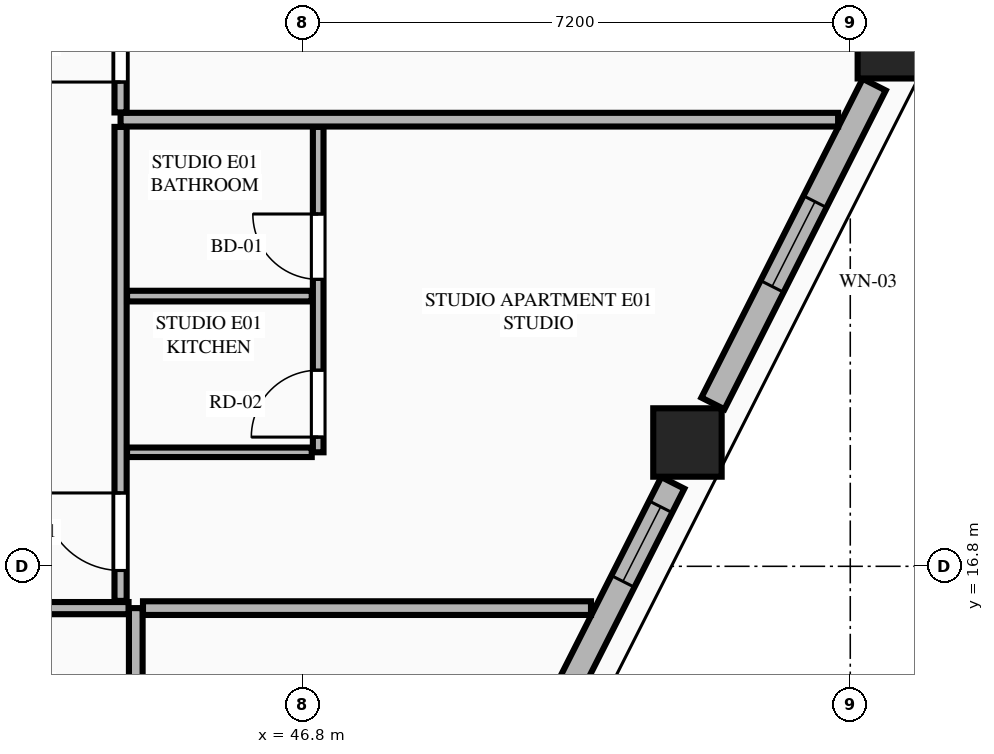
"""IFC4 building model, lengths in metres.
Left out: names, types, materials, properties, quantities, classifications, styles, units other than length and angle.
Written with IfcOpenShell. Run it as: python <this file> out.ifc"""

import sys

from ifc_helpers import new_model, si_unit, direction, frame, frame_2d, origin, origin_2d, place, context, subcontext, project, spatial, rectangle, extrude, element, fill, save


model = new_model("IFC4")
c1 = context("Model", 3, precision=1e-05, world=origin(), true_north=direction((0.0, 1.0)))
c2 = subcontext(c1, "Body", "Model", "MODEL_VIEW")
j1 = project(units=[si_unit("LENGTHUNIT", "METRE"), si_unit("PLANEANGLEUNIT", "RADIAN")], contexts=[c1])
p1 = place(None, origin())
s1 = spatial("IfcSite", under=j1, at=p1, CompositionType="ELEMENT")
p2 = place(p1, origin())
s2 = spatial("IfcBuilding", under=s1, at=p2, CompositionType="ELEMENT")
p3 = place(p2, frame((0.0, 0.0, 200.3)))
s3 = spatial("IfcBuildingStorey", under=s2, at=p3, CompositionType="ELEMENT", Elevation=200.3)
for number, where, z_axis, x_axis in (
    (1, (51.858, 18.429, 0.0), (0.0, 0.0, 1.0), (1.0, 0.0, 0.0)),
    (2, (54.547, 23.668, 0.0), (0.0, 0.0, 1.0), (1.0, 0.0, 0.0)),
):
    element("IfcColumn", number, at=place(p3, frame(where, z_axis=z_axis, x_axis=x_axis)), inside=s3, PredefinedType="COLUMN", context=c2, shape_type="SweptSolid", body=[
        extrude(rectangle(XDim=0.9, YDim=0.9, at=origin_2d()), origin(), (0.0, 0.0, 1.0), 3.55),
    ])
p4 = place(p3, frame((49.448, 13.517, 0.0), z_axis=(0.0, 0.0, 1.0), x_axis=(0.451544279509, 0.892248711763, 0.0)))
e3 = element("IfcWall", 3, at=p4, inside=s3, PredefinedType="STANDARD", context=c2, shape_type="SweptSolid", body=[
    extrude(rectangle(XDim=4.91, YDim=0.34, at=frame_2d((2.455, 0.0))), origin(), (0.0, 0.0, 1.0), 2.883),
])
p5 = place(p4, frame((0.851, 0.0, 0.75)))
e4 = element("IfcOpeningElement", 4, at=p5, cuts=e3, PredefinedType="OPENING", context=c2, shape_type="SweptSolid", body=[
    extrude(rectangle(XDim=1.1, YDim=1.983, at=frame_2d((0.55, 0.991))), frame((0.0, 0.18, 0.0), z_axis=(0.0, -1.0, 0.0), x_axis=(1.0, 0.0, 0.0)), (0.0, 0.0, 1.0), 0.36),
])
p6 = place(p4, frame((3.457, 0.0, 0.75)))
e5 = element("IfcOpeningElement", 5, at=p6, cuts=e3, PredefinedType="OPENING", context=c2, shape_type="SweptSolid", body=[
    extrude(rectangle(XDim=1.1, YDim=1.983, at=frame_2d((0.55, 0.991))), frame((0.0, 0.18, 0.0), z_axis=(0.0, -1.0, 0.0), x_axis=(1.0, 0.0, 0.0)), (0.0, 0.0, 1.0), 0.36),
])
p7 = place(p3, frame((52.193, 18.943, 0.0), z_axis=(0.0, 0.0, 1.0), x_axis=(0.451447222193, 0.892297823361, 0.0)))
e6 = element("IfcWall", 6, at=p7, inside=s3, PredefinedType="STANDARD", context=c2, shape_type="SweptSolid", body=[
    extrude(rectangle(XDim=4.7, YDim=0.34, at=frame_2d((2.35, 0.0))), origin(), (0.0, 0.0, 1.0), 2.883),
])
p8 = place(p7, frame((1.725, 0.0, 0.75)))
e7 = element("IfcOpeningElement", 7, at=p8, cuts=e6, PredefinedType="OPENING", context=c2, shape_type="SweptSolid", body=[
    extrude(rectangle(XDim=1.25, YDim=1.95, at=frame_2d((0.625, 0.975))), frame((0.0, 0.18, 0.0), z_axis=(0.0, -1.0, 0.0), x_axis=(1.0, 0.0, 0.0)), (0.0, 0.0, 1.0), 0.36),
])
p9 = place(p3, frame((44.6, 5.968, 0.0), z_axis=(0.0, 0.0, 1.0), x_axis=(0.0, 1.0, 0.0)))
e8 = element("IfcWall", 8, at=p9, inside=s3, PredefinedType="PARTITIONING", context=c2, shape_type="SweptSolid", body=[
    extrude(rectangle(XDim=10.282, YDim=0.18, at=frame_2d((5.141, 0.0))), origin(), (0.0, 0.0, 1.0), 3.35),
])
p10 = place(p3, frame((36.038, 16.25, 0.0), z_axis=(0.0, 0.0, 1.0), x_axis=(1.0, 0.0, 0.0)))
e9 = element("IfcWall", 9, at=p10, inside=s3, PredefinedType="PARTITIONING", context=c2, shape_type="SweptSolid", body=[
    extrude(rectangle(XDim=8.467, YDim=0.16, at=frame_2d((4.233, 0.0))), origin(), (0.0, 0.0, 1.0), 3.35),
])
p11 = place(p10, frame((0.355, 0.0, 0.0)))
e10 = element("IfcOpeningElement", 10, at=p11, cuts=e9, PredefinedType="OPENING", context=c2, shape_type="SweptSolid", body=[
    extrude(rectangle(XDim=1.02, YDim=2.25, at=frame_2d((0.51, 1.125))), frame((0.0, 0.09, 0.0), z_axis=(0.0, -1.0, 0.0), x_axis=(1.0, 0.0, 0.0)), (0.0, 0.0, 1.0), 0.18),
])
p12 = place(p3, frame((44.695, 16.25, 0.0), z_axis=(0.0, 0.0, 1.0), x_axis=(1.0, 0.0, 0.0)))
e11 = element("IfcWall", 11, at=p12, inside=s3, PredefinedType="PARTITIONING", context=c2, shape_type="SweptSolid", body=[
    extrude(rectangle(XDim=5.894, YDim=0.18, at=frame_2d((2.947, 0.0))), origin(), (0.0, 0.0, 1.0), 3.35),
])
p13 = place(p3, frame((44.4, 16.345, 0.0), z_axis=(0.0, 0.0, 1.0), x_axis=(0.0, 1.0, 0.0)))
e12 = element("IfcWall", 12, at=p13, inside=s3, PredefinedType="PARTITIONING", context=c2, shape_type="SweptSolid", body=[
    extrude(rectangle(XDim=6.236, YDim=0.16, at=frame_2d((3.118, 0.0))), origin(), (0.0, 0.0, 1.0), 3.35),
])
p14 = place(p13, frame((0.4, 0.0, 0.0)))
e13 = element("IfcOpeningElement", 13, at=p14, cuts=e12, PredefinedType="OPENING", context=c2, shape_type="SweptSolid", body=[
    extrude(rectangle(XDim=1.02, YDim=2.25, at=frame_2d((0.51, 1.125))), frame((0.0, 0.09, 0.0), z_axis=(0.0, -1.0, 0.0), x_axis=(1.0, 0.0, 0.0)), (0.0, 0.0, 1.0), 0.18),
])
p15 = place(p3, frame((44.485, 18.3, 0.0), z_axis=(0.0, 0.0, 1.0), x_axis=(1.0, 0.0, 0.0)))
e14 = element("IfcWall", 14, at=p15, inside=s3, PredefinedType="PARTITIONING", context=c2, shape_type="SweptSolid", body=[
    extrude(rectangle(XDim=2.43, YDim=0.125, at=frame_2d((1.215, 0.0))), origin(), (0.0, 0.0, 1.0), 2.807),
])
p16 = place(p3, frame((47.0, 18.3, 0.0), z_axis=(0.0, 0.0, 1.0), x_axis=(0.0, 1.0, 0.0)))
e15 = element("IfcWall", 15, at=p16, inside=s3, PredefinedType="PLUMBINGWALL", context=c2, shape_type="SweptSolid", body=[
    extrude(rectangle(XDim=4.281, YDim=0.14, at=frame_2d((2.141, 0.0))), origin(), (0.0, 0.0, 1.0), 3.35),
])
p17 = place(p16, frame((2.275, 0.0, 0.0)))
e16 = element("IfcOpeningElement", 16, at=p17, cuts=e15, PredefinedType="OPENING", context=c2, shape_type="SweptSolid", body=[
    extrude(rectangle(XDim=0.86, YDim=2.1, at=frame_2d((0.43, 1.05))), frame((0.0, 0.08, 0.0), z_axis=(0.0, -1.0, 0.0), x_axis=(1.0, 0.0, 0.0)), (0.0, 0.0, 1.0), 0.16),
])
p18 = place(p16, frame((0.2, 0.0, 0.0)))
e17 = element("IfcOpeningElement", 17, at=p18, cuts=e15, PredefinedType="OPENING", context=c2, shape_type="SweptSolid", body=[
    extrude(rectangle(XDim=0.88, YDim=2.15, at=frame_2d((0.44, 1.075))), frame((0.0, 0.08, 0.0), z_axis=(0.0, -1.0, 0.0), x_axis=(1.0, 0.0, 0.0)), (0.0, 0.0, 1.0), 0.16),
])
p19 = place(p3, frame((44.485, 20.355, 0.0), z_axis=(0.0, 0.0, 1.0), x_axis=(1.0, 0.0, 0.0)))
e18 = element("IfcWall", 18, at=p19, inside=s3, PredefinedType="PLUMBINGWALL", context=c2, shape_type="SweptSolid", body=[
    extrude(rectangle(XDim=2.43, YDim=0.14, at=frame_2d((1.215, 0.0))), origin(), (0.0, 0.0, 1.0), 3.35),
])
p20 = place(p3, frame((44.4, 22.676, 0.0), z_axis=(0.0, 0.0, 1.0), x_axis=(1.0, 0.0, 0.0)))
e19 = element("IfcWall", 19, at=p20, inside=s3, PredefinedType="PARTITIONING", context=c2, shape_type="SweptSolid", body=[
    extrude(rectangle(XDim=9.44, YDim=0.18, at=frame_2d((4.72, 0.0))), origin(), (0.0, 0.0, 1.0), 3.35),
])
p21 = place(p3, frame((44.4, 22.771, 0.0), z_axis=(0.0, 0.0, 1.0), x_axis=(0.0, 1.0, 0.0)))
e20 = element("IfcWall", 20, at=p21, inside=s3, PredefinedType="PARTITIONING", context=c2, shape_type="SweptSolid", body=[
    extrude(rectangle(XDim=6.047, YDim=0.16, at=frame_2d((3.023, 0.0))), origin(), (0.0, 0.0, 1.0), 3.35),
])
p22 = place(p21, frame((0.4, 0.0, 0.0)))
e21 = element("IfcOpeningElement", 21, at=p22, cuts=e20, PredefinedType="OPENING", context=c2, shape_type="SweptSolid", body=[
    extrude(rectangle(XDim=1.02, YDim=2.25, at=frame_2d((0.51, 1.125))), frame((0.0, 0.09, 0.0), z_axis=(0.0, -1.0, 0.0), x_axis=(1.0, 0.0, 0.0)), (0.0, 0.0, 1.0), 0.18),
])
p23 = place(p8, origin())
e22 = element("IfcWindow", 22, at=p23, inside=s3, PartitioningType="SINGLE_PANEL", PredefinedType="WINDOW", context=c2, shape_type="SweptSolid", body=[
    extrude(rectangle(XDim=1.25, YDim=1.95, at=frame_2d((0.625, 0.975))), frame((0.0, 0.03, 0.0), z_axis=(0.0, -1.0, 0.0), x_axis=(1.0, 0.0, 0.0)), (0.0, 0.0, 1.0), 0.06),
])
fill(e7, e22)
p24 = place(p17, origin())
e23 = element("IfcDoor", 23, at=p24, inside=s3, OperationType="SINGLE_SWING_RIGHT", PredefinedType="DOOR", context=c2, shape_type="SweptSolid", body=[
    extrude(rectangle(XDim=0.86, YDim=2.1, at=frame_2d((0.43, 1.05))), frame((0.0, 0.025, 0.0), z_axis=(0.0, -1.0, 0.0), x_axis=(1.0, 0.0, 0.0)), (0.0, 0.0, 1.0), 0.05),
])
fill(e16, e23)
p25 = place(p14, origin())
e24 = element("IfcDoor", 24, at=p25, inside=s3, OperationType="SINGLE_SWING_RIGHT", PredefinedType="DOOR", context=c2, shape_type="SweptSolid", body=[
    extrude(rectangle(XDim=1.02, YDim=2.25, at=frame_2d((0.51, 1.125))), frame((0.0, 0.025, 0.0), z_axis=(0.0, -1.0, 0.0), x_axis=(1.0, 0.0, 0.0)), (0.0, 0.0, 1.0), 0.05),
])
fill(e13, e24)
p26 = place(p18, origin())
e25 = element("IfcDoor", 25, at=p26, inside=s3, OperationType="SINGLE_SWING_LEFT", PredefinedType="DOOR", context=c2, shape_type="SweptSolid", body=[
    extrude(rectangle(XDim=0.88, YDim=2.15, at=frame_2d((0.44, 1.075))), frame((0.0, 0.025, 0.0), z_axis=(0.0, -1.0, 0.0), x_axis=(1.0, 0.0, 0.0)), (0.0, 0.0, 1.0), 0.05),
])
fill(e17, e25)
p27 = place(p22, origin())
e26 = element("IfcDoor", 26, at=p27, inside=s3, OperationType="SINGLE_SWING_LEFT", PredefinedType="DOOR", context=c2, shape_type="SweptSolid", body=[
    extrude(rectangle(XDim=1.02, YDim=2.25, at=frame_2d((0.51, 1.125))), frame((0.0, 0.025, 0.0), z_axis=(0.0, -1.0, 0.0), x_axis=(1.0, 0.0, 0.0)), (0.0, 0.0, 1.0), 0.05),
])
fill(e21, e26)
p28 = place(p6, origin())
e27 = element("IfcWindow", 27, at=p28, inside=s3, PartitioningType="SINGLE_PANEL", PredefinedType="WINDOW", context=c2, shape_type="SweptSolid", body=[
    extrude(rectangle(XDim=1.1, YDim=1.983, at=frame_2d((0.55, 0.991))), frame((0.0, 0.03, 0.0), z_axis=(0.0, -1.0, 0.0), x_axis=(1.0, 0.0, 0.0)), (0.0, 0.0, 1.0), 0.06),
])
fill(e5, e27)
save(model, sys.argv[1])
